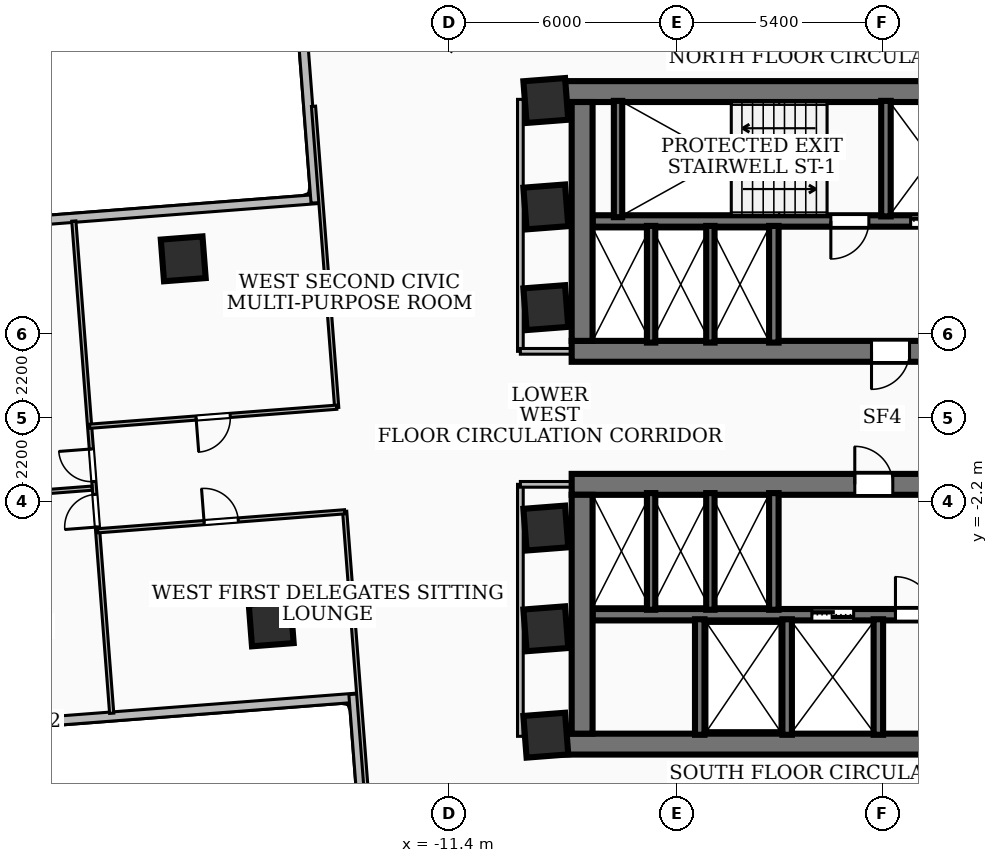
"""IFC4 building model, lengths in metres.
Left out: names, types, materials, properties, quantities, classifications, styles, units other than length and angle.
Written with IfcOpenShell. Run it as: python <this file> out.ifc"""

import sys

from ifc_helpers import new_model, si_unit, direction, frame, frame_2d, origin, origin_2d, place, context, subcontext, project, spatial, rectangle, extrude, element, fill, save


model = new_model("IFC4")
c1 = context("Model", 3, precision=1e-05, world=origin(), true_north=direction((0.0, 1.0)))
c2 = subcontext(c1, "Body", "Model", "MODEL_VIEW")
j1 = project(units=[si_unit("LENGTHUNIT", "METRE"), si_unit("PLANEANGLEUNIT", "RADIAN")], contexts=[c1])
p1 = place(None, origin())
s1 = spatial("IfcSite", under=j1, at=p1, CompositionType="ELEMENT")
p2 = place(p1, origin())
s2 = spatial("IfcBuilding", under=s1, at=p2, CompositionType="ELEMENT")
p3 = place(p2, frame((0.0, 0.0, 60.48)))
s3 = spatial("IfcBuildingStorey", under=s2, at=p3, CompositionType="ELEMENT", Elevation=60.48)
p4 = place(p3, frame((-8.78, 8.585, 0.0), z_axis=(0.0, 0.0, 1.0), x_axis=(1.0, 0.0, 0.0)))
e1 = element("IfcWall", 1, at=p4, inside=s3, PredefinedType="SHEAR", context=c2, shape_type="SweptSolid", body=[
    extrude(rectangle(XDim=17.56, YDim=0.55, at=frame_2d((8.78, 0.0))), origin(), (0.0, 0.0, 1.0), 3.32),
])
p5 = place(p3, frame((8.17, 1.75, 0.0), z_axis=(0.0, 0.0, 1.0), x_axis=(-1.0, 0.0, 0.0)))
e2 = element("IfcWall", 2, at=p5, inside=s3, PredefinedType="SHEAR", context=c2, shape_type="SweptSolid", body=[
    extrude(rectangle(XDim=16.34, YDim=0.55, at=frame_2d((8.17, 0.0))), origin(), (0.0, 0.0, 1.0), 3.32),
])
p6 = place(p5, frame((7.45, 0.0, 0.0)))
e3 = element("IfcOpeningElement", 3, at=p6, cuts=e2, PredefinedType="OPENING", context=c2, shape_type="SweptSolid", body=[
    extrude(rectangle(XDim=1.0, YDim=2.1, at=frame_2d((0.5, 1.05))), frame((0.0, 0.285, 0.0), z_axis=(0.0, -1.0, 0.0), x_axis=(1.0, 0.0, 0.0)), (0.0, 0.0, 1.0), 0.57),
])
p7 = place(p5, frame((3.4, 0.0, 0.0)))
e4 = element("IfcOpeningElement", 4, at=p7, cuts=e2, PredefinedType="OPENING", context=c2, shape_type="SweptSolid", body=[
    extrude(rectangle(XDim=0.9, YDim=2.06, at=frame_2d((0.45, 1.03))), frame((0.0, 0.285, 0.0), z_axis=(0.0, -1.0, 0.0), x_axis=(1.0, 0.0, 0.0)), (0.0, 0.0, 1.0), 0.57),
])
p8 = place(p5, frame((1.1, 0.0, 0.0)))
e5 = element("IfcOpeningElement", 5, at=p8, cuts=e2, PredefinedType="OPENING", context=c2, shape_type="SweptSolid", body=[
    extrude(rectangle(XDim=0.9, YDim=2.06, at=frame_2d((0.45, 1.03))), frame((0.0, 0.285, 0.0), z_axis=(0.0, -1.0, 0.0), x_axis=(1.0, 0.0, 0.0)), (0.0, 0.0, 1.0), 0.57),
])
p9 = place(p3, frame((-7.895, 2.025, 0.0), z_axis=(0.0, 0.0, 1.0), x_axis=(0.0, 1.0, 0.0)))
e6 = element("IfcWall", 6, at=p9, inside=s3, PredefinedType="SHEAR", context=c2, shape_type="SweptSolid", body=[
    extrude(rectangle(XDim=6.285, YDim=0.55, at=frame_2d((3.143, 0.0))), origin(), (0.0, 0.0, 1.0), 3.32),
])
p10 = place(p3, frame((7.62, 5.18, 0.0), z_axis=(0.0, 0.0, 1.0), x_axis=(-1.0, 0.0, 0.0)))
e7 = element("IfcWall", 7, at=p10, inside=s3, PredefinedType="SOLIDWALL", context=c2, shape_type="SweptSolid", body=[
    extrude(rectangle(XDim=15.24, YDim=0.3, at=frame_2d((7.62, 0.0))), origin(), (0.0, 0.0, 1.0), 3.32),
])
p11 = place(p10, frame((5.77, 0.0, 0.0)))
e8 = element("IfcOpeningElement", 8, at=p11, cuts=e7, PredefinedType="OPENING", context=c2, shape_type="SweptSolid", body=[
    extrude(rectangle(XDim=1.1, YDim=2.15, at=frame_2d((0.55, 1.075))), frame((0.0, 0.16, 0.0), z_axis=(0.0, -1.0, 0.0), x_axis=(1.0, 0.0, 0.0)), (0.0, 0.0, 1.0), 0.32),
])
p12 = place(p10, frame((2.97, 0.0, 0.0)))
e9 = element("IfcOpeningElement", 9, at=p12, cuts=e7, PredefinedType="OPENING", context=c2, shape_type="SweptSolid", body=[
    extrude(rectangle(XDim=1.1, YDim=2.15, at=frame_2d((0.55, 1.075))), frame((0.0, 0.16, 0.0), z_axis=(0.0, -1.0, 0.0), x_axis=(1.0, 0.0, 0.0)), (0.0, 0.0, 1.0), 0.32),
])
p13 = place(p10, frame((7.97, 0.0, 0.0)))
e10 = element("IfcOpeningElement", 10, at=p13, cuts=e7, PredefinedType="OPENING", context=c2, shape_type="SweptSolid", body=[
    extrude(rectangle(XDim=1.0, YDim=2.1, at=frame_2d((0.5, 1.05))), frame((0.0, 0.16, 0.0), z_axis=(0.0, -1.0, 0.0), x_axis=(1.0, 0.0, 0.0)), (0.0, 0.0, 1.0), 0.32),
])
p14 = place(p3, frame((8.78, -8.585, 0.0), z_axis=(0.0, 0.0, 1.0), x_axis=(-1.0, 0.0, 0.0)))
e11 = element("IfcWall", 11, at=p14, inside=s3, PredefinedType="SHEAR", context=c2, shape_type="SweptSolid", body=[
    extrude(rectangle(XDim=17.56, YDim=0.55, at=frame_2d((8.78, 0.0))), origin(), (0.0, 0.0, 1.0), 3.32),
])
p15 = place(p3, frame((-8.17, -1.75, 0.0), z_axis=(0.0, 0.0, 1.0), x_axis=(1.0, 0.0, 0.0)))
e12 = element("IfcWall", 12, at=p15, inside=s3, PredefinedType="SHEAR", context=c2, shape_type="SweptSolid", body=[
    extrude(rectangle(XDim=16.34, YDim=0.55, at=frame_2d((8.17, 0.0))), origin(), (0.0, 0.0, 1.0), 3.32),
])
p16 = place(p15, frame((7.45, 0.0, 0.0)))
e13 = element("IfcOpeningElement", 13, at=p16, cuts=e12, PredefinedType="OPENING", context=c2, shape_type="SweptSolid", body=[
    extrude(rectangle(XDim=1.0, YDim=2.1, at=frame_2d((0.5, 1.05))), frame((0.0, 0.285, 0.0), z_axis=(0.0, -1.0, 0.0), x_axis=(1.0, 0.0, 0.0)), (0.0, 0.0, 1.0), 0.57),
])
p17 = place(p15, frame((10.965, 0.0, 0.0)))
e14 = element("IfcOpeningElement", 14, at=p17, cuts=e12, PredefinedType="OPENING", context=c2, shape_type="SweptSolid", body=[
    extrude(rectangle(XDim=1.05, YDim=2.15, at=frame_2d((0.525, 1.075))), frame((0.0, 0.285, 0.0), z_axis=(0.0, -1.0, 0.0), x_axis=(1.0, 0.0, 0.0)), (0.0, 0.0, 1.0), 0.57),
])
p18 = place(p15, frame((12.525, 0.0, 0.0)))
e15 = element("IfcOpeningElement", 15, at=p18, cuts=e12, PredefinedType="OPENING", context=c2, shape_type="SweptSolid", body=[
    extrude(rectangle(XDim=1.05, YDim=2.15, at=frame_2d((0.525, 1.075))), frame((0.0, 0.285, 0.0), z_axis=(0.0, -1.0, 0.0), x_axis=(1.0, 0.0, 0.0)), (0.0, 0.0, 1.0), 0.57),
])
p19 = place(p15, frame((14.085, 0.0, 0.0)))
e16 = element("IfcOpeningElement", 16, at=p19, cuts=e12, PredefinedType="OPENING", context=c2, shape_type="SweptSolid", body=[
    extrude(rectangle(XDim=1.05, YDim=2.15, at=frame_2d((0.525, 1.075))), frame((0.0, 0.285, 0.0), z_axis=(0.0, -1.0, 0.0), x_axis=(1.0, 0.0, 0.0)), (0.0, 0.0, 1.0), 0.57),
])
p20 = place(p3, frame((-7.895, -8.31, 0.0), z_axis=(0.0, 0.0, 1.0), x_axis=(0.0, 1.0, 0.0)))
e17 = element("IfcWall", 17, at=p20, inside=s3, PredefinedType="SHEAR", context=c2, shape_type="SweptSolid", body=[
    extrude(rectangle(XDim=6.285, YDim=0.55, at=frame_2d((3.143, 0.0))), origin(), (0.0, 0.0, 1.0), 3.32),
])
p21 = place(p3, frame((-7.62, -5.18, 0.0), z_axis=(0.0, 0.0, 1.0), x_axis=(1.0, 0.0, 0.0)))
e18 = element("IfcWall", 18, at=p21, inside=s3, PredefinedType="SOLIDWALL", context=c2, shape_type="SweptSolid", body=[
    extrude(rectangle(XDim=15.24, YDim=0.3, at=frame_2d((7.62, 0.0))), origin(), (0.0, 0.0, 1.0), 3.32),
])
p22 = place(p21, frame((5.77, 0.0, 0.0)))
e19 = element("IfcOpeningElement", 19, at=p22, cuts=e18, PredefinedType="OPENING", context=c2, shape_type="SweptSolid", body=[
    extrude(rectangle(XDim=1.1, YDim=2.15, at=frame_2d((0.55, 1.075))), frame((0.0, 0.16, 0.0), z_axis=(0.0, -1.0, 0.0), x_axis=(1.0, 0.0, 0.0)), (0.0, 0.0, 1.0), 0.32),
])
p23 = place(p21, frame((7.97, 0.0, 0.0)))
e20 = element("IfcOpeningElement", 20, at=p23, cuts=e18, PredefinedType="OPENING", context=c2, shape_type="SweptSolid", body=[
    extrude(rectangle(XDim=1.0, YDim=2.1, at=frame_2d((0.5, 1.05))), frame((0.0, 0.16, 0.0), z_axis=(0.0, -1.0, 0.0), x_axis=(1.0, 0.0, 0.0)), (0.0, 0.0, 1.0), 0.32),
])
p24 = place(p3, frame((-6.95, 5.28, 0.0), z_axis=(0.0, 0.0, 1.0), x_axis=(0.0, 1.0, 0.0)))
e21 = element("IfcWall", 21, at=p24, inside=s3, PredefinedType="SOLIDWALL", context=c2, shape_type="SweptSolid", body=[
    extrude(rectangle(XDim=3.06, YDim=0.22, at=frame_2d((1.53, 0.0))), origin(), (0.0, 0.0, 1.0), 3.32),
])
p25 = place(p3, frame((0.1, 5.3, 0.0), z_axis=(0.0, 0.0, 1.0), x_axis=(0.0, 1.0, 0.0)))
e22 = element("IfcWall", 22, at=p25, inside=s3, PredefinedType="SOLIDWALL", context=c2, shape_type="SweptSolid", body=[
    extrude(rectangle(XDim=3.04, YDim=0.25, at=frame_2d((1.52, 0.0))), origin(), (0.0, 0.0, 1.0), 3.32),
])
p26 = place(p3, frame((-2.85, 1.98, 0.0), z_axis=(0.0, 0.0, 1.0), x_axis=(0.0, 1.0, 0.0)))
e23 = element("IfcWall", 23, at=p26, inside=s3, PredefinedType="SOLIDWALL", context=c2, shape_type="SweptSolid", body=[
    extrude(rectangle(XDim=3.07, YDim=0.25, at=frame_2d((1.535, 0.0))), origin(), (0.0, 0.0, 1.0), 3.32),
])
for number, where, z_axis, x_axis in (
    (24, (-0.1, -8.34, 0.0), (0.0, 0.0, 1.0), (0.0, 1.0, 0.0)),
    (25, (-2.5, -8.34, 0.0), (0.0, 0.0, 1.0), (0.0, 1.0, 0.0)),
    (26, (-4.8, -8.34, 0.0), (0.0, 0.0, 1.0), (0.0, 1.0, 0.0)),
):
    element("IfcWall", number, at=place(p3, frame(where, z_axis=z_axis, x_axis=x_axis)), inside=s3, PredefinedType="SOLIDWALL", context=c2, shape_type="SweptSolid", body=[
        extrude(rectangle(XDim=3.04, YDim=0.25, at=frame_2d((1.52, 0.0))), origin(), (0.0, 0.0, 1.0), 3.32),
    ])
p27 = place(p3, frame((-2.85, -5.05, 0.0), z_axis=(0.0, 0.0, 1.0), x_axis=(0.0, 1.0, 0.0)))
e27 = element("IfcWall", 27, at=p27, inside=s3, PredefinedType="SOLIDWALL", context=c2, shape_type="SweptSolid", body=[
    extrude(rectangle(XDim=3.07, YDim=0.25, at=frame_2d((1.535, 0.0))), origin(), (0.0, 0.0, 1.0), 3.32),
])
for number, where, z_axis, x_axis in (
    (28, (-6.08, 1.98, 0.0), (0.0, 0.0, 1.0), (0.0, 1.0, 0.0)),
    (29, (-4.52, 1.98, 0.0), (0.0, 0.0, 1.0), (0.0, 1.0, 0.0)),
    (30, (-6.08, -5.05, 0.0), (0.0, 0.0, 1.0), (0.0, 1.0, 0.0)),
    (31, (-4.52, -5.05, 0.0), (0.0, 0.0, 1.0), (0.0, 1.0, 0.0)),
):
    element("IfcWall", number, at=place(p3, frame(where, z_axis=z_axis, x_axis=x_axis)), inside=s3, PredefinedType="SOLIDWALL", context=c2, shape_type="SweptSolid", body=[
        extrude(rectangle(XDim=3.07, YDim=0.22, at=frame_2d((1.535, 0.0))), origin(), (0.0, 0.0, 1.0), 3.32),
    ])
for number, where, z_axis, x_axis in (
    (32, (-8.85, -5.55, 0.0), (0.0, 0.0, 1.0), (0.997, 0.077, 0.0)),
    (33, (-8.85, -2.9, 0.0), (0.0, 0.0, 1.0), (0.997, 0.077, 0.0)),
    (34, (-8.85, 2.9, 0.0), (0.0, 0.0, 1.0), (0.997, 0.077, 0.0)),
    (35, (-8.85, 5.55, 0.0), (0.0, 0.0, 1.0), (0.997, 0.077, 0.0)),
    (36, (-8.85, 8.35, 0.0), (0.0, 0.0, 1.0), (0.997, 0.077, 0.0)),
    (37, (-8.85, -8.35, 0.0), (0.0, 0.0, 1.0), (0.997, 0.077, 0.0)),
    (38, (-18.391, 4.184, 0.0), (0.0, 0.0, 1.0), (0.997, 0.077, 0.0)),
    (39, (-16.076, -5.421, 0.0), (0.0, 0.0, 1.0), (0.997, 0.077, 0.0)),
):
    element("IfcColumn", number, at=place(p3, frame(where, z_axis=z_axis, x_axis=x_axis)), inside=s3, PredefinedType="COLUMN", context=c2, shape_type="SweptSolid", body=[
        extrude(rectangle(XDim=1.1, YDim=1.1, at=origin_2d()), origin(), (0.0, 0.0, 1.0), 3.6),
    ])
p28 = place(p3, frame((-13.81, -7.362, 0.0), z_axis=(0.0, 0.0, 1.0), x_axis=(-0.997055761943, -0.076679903335, 0.0)))
e40 = element("IfcWall", 40, at=p28, inside=s3, PredefinedType="SOLIDWALL", context=c2, shape_type="SweptSolid", body=[
    extrude(rectangle(XDim=16.875, YDim=0.24, at=frame_2d((8.438, 0.0))), origin(), (0.0, 0.0, 1.0), 3.32),
])
p29 = place(p28, frame((13.675, 0.0, 0.85)))
e41 = element("IfcOpeningElement", 41, at=p29, cuts=e40, PredefinedType="OPENING", context=c2, shape_type="SweptSolid", body=[
    extrude(rectangle(XDim=2.1, YDim=2.0, at=frame_2d((1.05, 1.0))), frame((0.0, 0.13, 0.0), z_axis=(0.0, -1.0, 0.0), x_axis=(1.0, 0.0, 0.0)), (0.0, 0.0, 1.0), 0.26),
])
p30 = place(p3, frame((-31.645, 4.465, 0.0), z_axis=(0.0, 0.0, 1.0), x_axis=(0.997051676532, 0.076733006752, 0.0)))
e42 = element("IfcWall", 42, at=p30, inside=s3, PredefinedType="SOLIDWALL", context=c2, shape_type="SweptSolid", body=[
    extrude(rectangle(XDim=16.876, YDim=0.24, at=frame_2d((8.438, 0.0))), origin(), (0.0, 0.0, 1.0), 3.32),
])
p31 = place(p30, frame((1.1, 0.0, 0.85)))
e43 = element("IfcOpeningElement", 43, at=p31, cuts=e42, PredefinedType="OPENING", context=c2, shape_type="SweptSolid", body=[
    extrude(rectangle(XDim=2.1, YDim=1.6, at=frame_2d((1.05, 0.8))), frame((0.0, 0.13, 0.0), z_axis=(0.0, -1.0, 0.0), x_axis=(1.0, 0.0, 0.0)), (0.0, 0.0, 1.0), 0.26),
])
p32 = place(p3, frame((-14.908, 5.657, 0.0), z_axis=(0.0, 0.0, 1.0), x_axis=(-0.076778128006, 0.997048202977, 0.0)))
e44 = element("IfcWall", 44, at=p32, inside=s3, PredefinedType="SOLIDWALL", context=c2, shape_type="SweptSolid", body=[
    extrude(rectangle(XDim=6.175, YDim=0.24, at=frame_2d((3.088, 0.0))), origin(), (0.0, 0.0, 1.0), 3.32),
])
p33 = place(p3, frame((-13.393, -14.028, 0.0), z_axis=(0.0, 0.0, 1.0), x_axis=(-0.076754366588, 0.997050032451, 0.0)))
e45 = element("IfcWall", 45, at=p33, inside=s3, PredefinedType="SOLIDWALL", context=c2, shape_type="SweptSolid", body=[
    extrude(rectangle(XDim=6.775, YDim=0.24, at=frame_2d((3.388, 0.0))), origin(), (0.0, 0.0, 1.0), 3.32),
])
p34 = place(p3, frame((-9.52, 1.75, 0.0), z_axis=(0.0, 0.0, 1.0), x_axis=(0.0, 1.0, 0.0)))
e46 = element("IfcWall", 46, at=p34, inside=s3, PredefinedType="PARTITIONING", context=c2, shape_type="SweptSolid", body=[
    extrude(rectangle(XDim=6.63, YDim=0.15, at=frame_2d((3.315, 0.0))), origin(), (0.0, 0.0, 1.0), 2.401),
])
p35 = place(p3, frame((-7.85, 1.75, 0.0), z_axis=(0.0, 0.0, 1.0), x_axis=(-1.0, 0.0, 0.0)))
e47 = element("IfcWall", 47, at=p35, inside=s3, PredefinedType="PARTITIONING", context=c2, shape_type="SweptSolid", body=[
    extrude(rectangle(XDim=1.67, YDim=0.15, at=frame_2d((0.835, 0.0))), origin(), (0.0, 0.0, 1.0), 2.385),
])
p36 = place(p3, frame((-9.52, -8.38, 0.0), z_axis=(0.0, 0.0, 1.0), x_axis=(0.0, 1.0, 0.0)))
e48 = element("IfcWall", 48, at=p36, inside=s3, PredefinedType="PARTITIONING", context=c2, shape_type="SweptSolid", body=[
    extrude(rectangle(XDim=6.63, YDim=0.15, at=frame_2d((3.315, 0.0))), origin(), (0.0, 0.0, 1.0), 2.401),
])
p37 = place(p3, frame((-7.85, -1.75, 0.0), z_axis=(0.0, 0.0, 1.0), x_axis=(-1.0, 0.0, 0.0)))
e49 = element("IfcWall", 49, at=p37, inside=s3, PredefinedType="PARTITIONING", context=c2, shape_type="SweptSolid", body=[
    extrude(rectangle(XDim=1.67, YDim=0.15, at=frame_2d((0.835, 0.0))), origin(), (0.0, 0.0, 1.0), 2.385),
])
p38 = place(p3, frame((-14.143, -2.462, 0.0), z_axis=(0.0, 0.0, 1.0), x_axis=(0.076722700704, -0.997052469631, 0.0)))
e50 = element("IfcWall", 50, at=p38, inside=s3, PredefinedType="PARTITIONING", context=c2, shape_type="SweptSolid", body=[
    extrude(rectangle(XDim=8.55, YDim=0.11, at=frame_2d((4.275, 0.0))), origin(), (0.0, 0.0, 1.0), 2.401),
])
p39 = place(p3, frame((-14.963, 8.197, 0.0), z_axis=(0.0, 0.0, 1.0), x_axis=(0.076708240121, -0.99705358226, 0.0)))
e51 = element("IfcWall", 51, at=p39, inside=s3, PredefinedType="PARTITIONING", context=c2, shape_type="SweptSolid", body=[
    extrude(rectangle(XDim=7.95, YDim=0.11, at=frame_2d((3.975, 0.0))), origin(), (0.0, 0.0, 1.0), 2.401),
])
p40 = place(p3, frame((-20.643, -2.972, 0.0), z_axis=(0.0, 0.0, 1.0), x_axis=(0.997055366468, 0.076685045461, 0.0)))
e52 = element("IfcWall", 52, at=p40, inside=s3, PredefinedType="PARTITIONING", context=c2, shape_type="SweptSolid", body=[
    extrude(rectangle(XDim=6.52, YDim=0.11, at=frame_2d((3.26, 0.0))), origin(), (0.0, 0.0, 1.0), 3.32),
])
p41 = place(p40, frame((2.81, 0.0, 0.0)))
e53 = element("IfcOpeningElement", 53, at=p41, cuts=e52, PredefinedType="OPENING", context=c2, shape_type="SweptSolid", body=[
    extrude(rectangle(XDim=0.9, YDim=2.06, at=frame_2d((0.45, 1.03))), frame((0.0, 0.065, 0.0), z_axis=(0.0, -1.0, 0.0), x_axis=(1.0, 0.0, 0.0)), (0.0, 0.0, 1.0), 0.13),
])
p42 = place(p3, frame((-14.354, 0.28, 0.0), z_axis=(0.0, 0.0, 1.0), x_axis=(-0.997043903764, -0.076833937604, 0.0)))
e54 = element("IfcWall", 54, at=p42, inside=s3, PredefinedType="PARTITIONING", context=c2, shape_type="SweptSolid", body=[
    extrude(rectangle(XDim=6.52, YDim=0.11, at=frame_2d((3.26, 0.0))), origin(), (0.0, 0.0, 1.0), 3.32),
])
p43 = place(p42, frame((2.81, 0.0, 0.0)))
e55 = element("IfcOpeningElement", 55, at=p43, cuts=e54, PredefinedType="OPENING", context=c2, shape_type="SweptSolid", body=[
    extrude(rectangle(XDim=0.9, YDim=2.06, at=frame_2d((0.45, 1.03))), frame((0.0, 0.065, 0.0), z_axis=(0.0, -1.0, 0.0), x_axis=(1.0, 0.0, 0.0)), (0.0, 0.0, 1.0), 0.13),
])
p44 = place(p3, frame((-20.789, -1.85, 0.0), z_axis=(0.0, 0.0, 1.0), x_axis=(-0.997050564889, -0.076747449822, 0.0)))
e56 = element("IfcWall", 56, at=p44, inside=s3, PredefinedType="PARTITIONING", context=c2, shape_type="SweptSolid", body=[
    extrude(rectangle(XDim=11.726, YDim=0.11, at=frame_2d((5.863, 0.0))), origin(), (0.0, 0.0, 1.0), 2.812),
])
p45 = place(p3, frame((-20.274, -7.773, 0.0), z_axis=(0.0, 0.0, 1.0), x_axis=(-0.076686437656, 0.997055259391, 0.0)))
e57 = element("IfcWall", 57, at=p45, inside=s3, PredefinedType="PARTITIONING", context=c2, shape_type="SweptSolid", body=[
    extrude(rectangle(XDim=12.989, YDim=0.11, at=frame_2d((6.495, 0.0))), origin(), (0.0, 0.0, 1.0), 2.401),
])
p46 = place(p45, frame((6.115, 0.0, 0.0)))
e58 = element("IfcOpeningElement", 58, at=p46, cuts=e57, PredefinedType="OPENING", context=c2, shape_type="SweptSolid", body=[
    extrude(rectangle(XDim=0.86, YDim=2.04, at=frame_2d((0.43, 1.02))), frame((0.0, 0.065, 0.0), z_axis=(0.0, -1.0, 0.0), x_axis=(1.0, 0.0, 0.0)), (0.0, 0.0, 1.0), 0.13),
])
p47 = place(p45, frame((4.915, 0.0, 0.0)))
e59 = element("IfcOpeningElement", 59, at=p47, cuts=e57, PredefinedType="OPENING", context=c2, shape_type="SweptSolid", body=[
    extrude(rectangle(XDim=0.86, YDim=2.04, at=frame_2d((0.43, 1.02))), frame((0.0, 0.065, 0.0), z_axis=(0.0, -1.0, 0.0), x_axis=(1.0, 0.0, 0.0)), (0.0, 0.0, 1.0), 0.13),
])
p48 = place(p6, origin())
e60 = element("IfcDoor", 60, at=p48, inside=s3, OperationType="SINGLE_SWING_RIGHT", PredefinedType="DOOR", context=c2, shape_type="SweptSolid", body=[
    extrude(rectangle(XDim=1.0, YDim=2.1, at=frame_2d((0.5, 1.05))), frame((0.0, 0.025, 0.0), z_axis=(0.0, -1.0, 0.0), x_axis=(1.0, 0.0, 0.0)), (0.0, 0.0, 1.0), 0.05),
])
fill(e3, e60)
p49 = place(p16, origin())
e61 = element("IfcDoor", 61, at=p49, inside=s3, OperationType="SINGLE_SWING_LEFT", PredefinedType="DOOR", context=c2, shape_type="SweptSolid", body=[
    extrude(rectangle(XDim=1.0, YDim=2.1, at=frame_2d((0.5, 1.05))), frame((0.0, 0.025, 0.0), z_axis=(0.0, -1.0, 0.0), x_axis=(1.0, 0.0, 0.0)), (0.0, 0.0, 1.0), 0.05),
])
fill(e13, e61)
p50 = place(p11, origin())
e62 = element("IfcDoor", 62, at=p50, inside=s3, OperationType="DOUBLE_DOOR_SLIDING", PredefinedType="DOOR", context=c2, shape_type="SweptSolid", body=[
    extrude(rectangle(XDim=1.1, YDim=2.15, at=frame_2d((0.55, 1.075))), frame((0.0, 0.025, 0.0), z_axis=(0.0, -1.0, 0.0), x_axis=(1.0, 0.0, 0.0)), (0.0, 0.0, 1.0), 0.05),
])
fill(e8, e62)
p51 = place(p13, origin())
e63 = element("IfcDoor", 63, at=p51, inside=s3, OperationType="SINGLE_SWING_RIGHT", PredefinedType="DOOR", context=c2, shape_type="SweptSolid", body=[
    extrude(rectangle(XDim=1.0, YDim=2.1, at=frame_2d((0.5, 1.05))), frame((0.0, 0.025, 0.0), z_axis=(0.0, -1.0, 0.0), x_axis=(1.0, 0.0, 0.0)), (0.0, 0.0, 1.0), 0.05),
])
fill(e10, e63)
p52 = place(p22, origin())
e64 = element("IfcDoor", 64, at=p52, inside=s3, OperationType="DOUBLE_DOOR_SLIDING", PredefinedType="DOOR", context=c2, shape_type="SweptSolid", body=[
    extrude(rectangle(XDim=1.1, YDim=2.15, at=frame_2d((0.55, 1.075))), frame((0.0, 0.025, 0.0), z_axis=(0.0, -1.0, 0.0), x_axis=(1.0, 0.0, 0.0)), (0.0, 0.0, 1.0), 0.05),
])
fill(e19, e64)
p53 = place(p23, origin())
e65 = element("IfcDoor", 65, at=p53, inside=s3, OperationType="SINGLE_SWING_LEFT", PredefinedType="DOOR", context=c2, shape_type="SweptSolid", body=[
    extrude(rectangle(XDim=1.0, YDim=2.1, at=frame_2d((0.5, 1.05))), frame((0.0, 0.025, 0.0), z_axis=(0.0, -1.0, 0.0), x_axis=(1.0, 0.0, 0.0)), (0.0, 0.0, 1.0), 0.05),
])
fill(e20, e65)
p54 = place(p41, origin())
e66 = element("IfcDoor", 66, at=p54, inside=s3, OperationType="SINGLE_SWING_LEFT", PredefinedType="DOOR", context=c2, shape_type="SweptSolid", body=[
    extrude(rectangle(XDim=0.9, YDim=2.06, at=frame_2d((0.45, 1.03))), frame((0.0, 0.025, 0.0), z_axis=(0.0, -1.0, 0.0), x_axis=(1.0, 0.0, 0.0)), (0.0, 0.0, 1.0), 0.05),
])
fill(e53, e66)
p55 = place(p43, origin())
e67 = element("IfcDoor", 67, at=p55, inside=s3, OperationType="SINGLE_SWING_RIGHT", PredefinedType="DOOR", context=c2, shape_type="SweptSolid", body=[
    extrude(rectangle(XDim=0.9, YDim=2.06, at=frame_2d((0.45, 1.03))), frame((0.0, 0.025, 0.0), z_axis=(0.0, -1.0, 0.0), x_axis=(1.0, 0.0, 0.0)), (0.0, 0.0, 1.0), 0.05),
])
fill(e55, e67)
p56 = place(p46, origin())
e68 = element("IfcDoor", 68, at=p56, inside=s3, OperationType="SINGLE_SWING_RIGHT", PredefinedType="DOOR", context=c2, shape_type="SweptSolid", body=[
    extrude(rectangle(XDim=0.86, YDim=2.04, at=frame_2d((0.43, 1.02))), frame((0.0, 0.025, 0.0), z_axis=(0.0, -1.0, 0.0), x_axis=(1.0, 0.0, 0.0)), (0.0, 0.0, 1.0), 0.05),
])
fill(e58, e68)
p57 = place(p47, origin())
e69 = element("IfcDoor", 69, at=p57, inside=s3, OperationType="SINGLE_SWING_LEFT", PredefinedType="DOOR", context=c2, shape_type="SweptSolid", body=[
    extrude(rectangle(XDim=0.86, YDim=2.04, at=frame_2d((0.43, 1.02))), frame((0.0, 0.025, 0.0), z_axis=(0.0, -1.0, 0.0), x_axis=(1.0, 0.0, 0.0)), (0.0, 0.0, 1.0), 0.05),
])
fill(e59, e69)
save(model, sys.argv[1])
